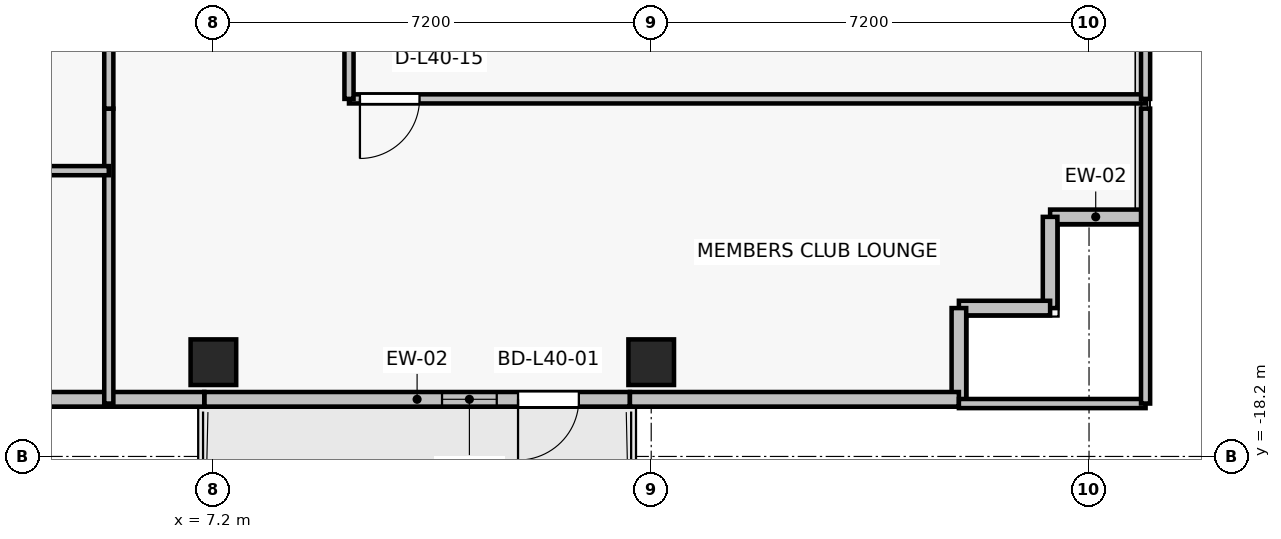
"""IFC4 building model, lengths in metres.
Left out: names, types, materials, properties, quantities, classifications, styles, units other than length and angle.
Written with IfcOpenShell. Run it as: python <this file> out.ifc"""

import sys

from ifc_helpers import new_model, si_unit, direction, frame, frame_2d, origin, origin_2d, place, context, subcontext, project, spatial, rectangle, extrude, source, transform, mapped, element, fill, save


model = new_model("IFC4")
c1 = context("Model", 3, precision=1e-05, world=origin(), true_north=direction((0.0, 1.0)))
c2 = subcontext(c1, "Body", "Model", "MODEL_VIEW")
j1 = project(units=[si_unit("LENGTHUNIT", "METRE"), si_unit("PLANEANGLEUNIT", "RADIAN")], contexts=[c1])
p1 = place(None, origin())
s1 = spatial("IfcSite", under=j1, at=p1, CompositionType="ELEMENT")
p2 = place(p1, origin())
s2 = spatial("IfcBuilding", under=s1, at=p2, CompositionType="ELEMENT")
p3 = place(p2, frame((0.0, 0.0, 146.2)))
s3 = spatial("IfcBuildingStorey", under=s2, at=p3, CompositionType="ELEMENT", Elevation=146.2)
for number, where, z_axis, x_axis in (
    (1, (7.2, -16.65, 0.0), (0.0, 0.0, 1.0), (1.0, 0.0, 0.0)),
    (2, (14.4, -16.65, 0.0), (0.0, 0.0, 1.0), (1.0, 0.0, 0.0)),
):
    element("IfcColumn", number, at=place(p3, frame(where, z_axis=z_axis, x_axis=x_axis)), inside=s3, PredefinedType="COLUMN", context=c2, shape_type="SweptSolid", body=[
        extrude(rectangle(XDim=0.75, YDim=0.75, at=origin_2d()), origin(), (0.0, 0.0, 1.0), 3.3),
    ])
p4 = place(p3, frame((14.05, -17.26, 0.0), z_axis=(0.0, 0.0, 1.0), x_axis=(-1.0, 0.0, 0.0)))
e3 = element("IfcWall", 3, at=p4, inside=s3, PredefinedType="SOLIDWALL", context=c2, shape_type="SweptSolid", body=[
    extrude(rectangle(XDim=7.0, YDim=0.24, at=frame_2d((3.5, 0.0))), origin(), (0.0, 0.0, 1.0), 2.665),
])
p5 = place(p4, frame((0.84, 0.0, 0.0)))
e4 = element("IfcOpeningElement", 4, at=p5, cuts=e3, PredefinedType="OPENING", context=c2, shape_type="SweptSolid", body=[
    extrude(rectangle(XDim=1.0, YDim=2.2, at=frame_2d((0.5, 1.1))), frame((0.0, 0.13, 0.0), z_axis=(0.0, -1.0, 0.0), x_axis=(1.0, 0.0, 0.0)), (0.0, 0.0, 1.0), 0.26),
])
p6 = place(p4, frame((2.19, 0.0, 0.85)))
e5 = element("IfcOpeningElement", 5, at=p6, cuts=e3, PredefinedType="OPENING", context=c2, shape_type="SweptSolid", body=[
    extrude(rectangle(XDim=0.9, YDim=1.35, at=frame_2d((0.45, 0.675))), frame((0.0, 0.13, 0.0), z_axis=(0.0, -1.0, 0.0), x_axis=(1.0, 0.0, 0.0)), (0.0, 0.0, 1.0), 0.26),
])
for number, where, z_axis, x_axis in (
    (6, (20.96, -14.26, 0.0), (0.0, 0.0, 1.0), (1.0, 0.0, 0.0)),
    (7, (20.96, -15.76, 0.0), (0.0, 0.0, 1.0), (0.0, 1.0, 0.0)),
    (8, (19.46, -15.76, 0.0), (0.0, 0.0, 1.0), (1.0, 0.0, 0.0)),
    (9, (19.46, -17.26, 0.0), (0.0, 0.0, 1.0), (0.0, 1.0, 0.0)),
):
    element("IfcWall", number, at=place(p3, frame(where, z_axis=z_axis, x_axis=x_axis)), inside=s3, PredefinedType="SOLIDWALL", context=c2, shape_type="SweptSolid", body=[
        extrude(rectangle(XDim=1.5, YDim=0.24, at=frame_2d((0.75, 0.0))), origin(), (0.0, 0.0, 1.0), 3.075),
    ])
p7 = place(p3, frame((14.05, -17.26, 0.0), z_axis=(0.0, 0.0, 1.0), x_axis=(1.0, 0.0, 0.0)))
e10 = element("IfcWall", 10, at=p7, inside=s3, PredefinedType="SOLIDWALL", context=c2, shape_type="SweptSolid", body=[
    extrude(rectangle(XDim=5.41, YDim=0.24, at=frame_2d((2.705, 0.0))), origin(), (0.0, 0.0, 1.0), 3.075),
])
p8 = place(p3, frame((3.2, -17.26, 0.0), z_axis=(0.0, 0.0, 1.0), x_axis=(1.0, 0.0, 0.0)))
e11 = element("IfcWall", 11, at=p8, inside=s3, PredefinedType="SOLIDWALL", context=c2, shape_type="SweptSolid", body=[
    extrude(rectangle(XDim=3.85, YDim=0.24, at=frame_2d((1.925, 0.0))), origin(), (0.0, 0.0, 1.0), 3.075),
])
p9 = place(p3, frame((22.53, -12.32, 0.0), z_axis=(0.0, 0.0, 1.0), x_axis=(-1.0, 0.0, 0.0)))
e12 = element("IfcWall", 12, at=p9, inside=s3, PredefinedType="PARTITIONING", context=c2, shape_type="SweptSolid", body=[
    extrude(rectangle(XDim=13.1, YDim=0.15, at=frame_2d((6.55, 0.0))), origin(), (0.0, 0.0, 1.0), 2.565),
])
p10 = place(p9, frame((11.94, 0.0, 0.0)))
e13 = element("IfcOpeningElement", 13, at=p10, cuts=e12, PredefinedType="OPENING", context=c2, shape_type="SweptSolid", body=[
    extrude(rectangle(XDim=0.98, YDim=2.15, at=frame_2d((0.49, 1.075))), frame((0.0, 0.085, 0.0), z_axis=(0.0, -1.0, 0.0), x_axis=(1.0, 0.0, 0.0)), (0.0, 0.0, 1.0), 0.17),
])
p11 = place(p3, frame((9.43, -12.32, 0.0), z_axis=(0.0, 0.0, 1.0), x_axis=(0.0, 1.0, 0.0)))
e14 = element("IfcWall", 14, at=p11, inside=s3, PredefinedType="PARTITIONING", context=c2, shape_type="SweptSolid", body=[
    extrude(rectangle(XDim=8.49, YDim=0.15, at=frame_2d((4.245, 0.0))), origin(), (0.0, 0.0, 1.0), 2.565),
])
p12 = place(p3, frame((22.53, -3.83, 0.0), z_axis=(0.0, 0.0, 1.0), x_axis=(0.0, -1.0, 0.0)))
e15 = element("IfcWall", 15, at=p12, inside=s3, PredefinedType="PARTITIONING", context=c2, shape_type="SweptSolid", body=[
    extrude(rectangle(XDim=8.49, YDim=0.15, at=frame_2d((4.245, 0.0))), origin(), (0.0, 0.0, 1.0), 2.665),
])
p13 = place(p3, frame((22.53, -17.33, 0.0), z_axis=(0.0, 0.0, 1.0), x_axis=(-1.0, 0.0, 0.0)))
e16 = element("IfcWall", 16, at=p13, inside=s3, PredefinedType="PARTITIONING", context=c2, shape_type="SweptSolid", body=[
    extrude(rectangle(XDim=3.07, YDim=0.15, at=frame_2d((1.535, 0.0))), origin(), (0.0, 0.0, 1.0), 2.665),
])
p14 = place(p3, frame((5.48, -17.33, 0.0), z_axis=(0.0, 0.0, 1.0), x_axis=(0.0, 1.0, 0.0)))
e17 = element("IfcWall", 17, at=p14, inside=s3, PredefinedType="PARTITIONING", context=c2, shape_type="SweptSolid", body=[
    extrude(rectangle(XDim=4.85, YDim=0.15, at=frame_2d((2.425, 0.0))), origin(), (0.0, 0.0, 1.0), 2.565),
])
p15 = place(p3, frame((22.53, -12.48, 0.0), z_axis=(0.0, 0.0, 1.0), x_axis=(0.0, -1.0, 0.0)))
e18 = element("IfcWall", 18, at=p15, inside=s3, PredefinedType="PARTITIONING", context=c2, shape_type="SweptSolid", body=[
    extrude(rectangle(XDim=4.85, YDim=0.15, at=frame_2d((2.425, 0.0))), origin(), (0.0, 0.0, 1.0), 3.075),
])
p16 = place(p3, frame((5.48, -13.5, 0.0), z_axis=(0.0, 0.0, 1.0), x_axis=(-1.0, 0.0, 0.0)))
e19 = element("IfcWall", 19, at=p16, inside=s3, PredefinedType="PARTITIONING", context=c2, shape_type="SweptSolid", body=[
    extrude(rectangle(XDim=10.96, YDim=0.15, at=frame_2d((5.48, 0.0))), origin(), (0.0, 0.0, 1.0), 2.565),
])
p17 = place(p3, frame((5.48, -3.83, 0.0), z_axis=(0.0, 0.0, 1.0), x_axis=(0.0, -1.0, 0.0)))
e20 = element("IfcWall", 20, at=p17, inside=s3, PredefinedType="PARTITIONING", context=c2, shape_type="SweptSolid", body=[
    extrude(rectangle(XDim=8.65, YDim=0.15, at=frame_2d((4.325, 0.0))), origin(), (0.0, 0.0, 1.0), 2.565),
])
m1 = source(origin(), c2, "Body", "SweptSolid", [
    extrude(rectangle(XDim=1.0, YDim=2.2, at=frame_2d((0.5, 1.1))), frame((0.0, 0.025, 0.0), z_axis=(0.0, -1.0, 0.0), x_axis=(1.0, 0.0, 0.0)), (0.0, 0.0, 1.0), 0.05),
])
p18 = place(p5, origin())
e21 = element("IfcDoor", 21, at=p18, inside=s3, OperationType="SINGLE_SWING_RIGHT", PredefinedType="DOOR", context=c2, shape_type="MappedRepresentation", body=[
    mapped(m1, transform((0.0, 0.0, 0.0), x_axis=(1.0, 0.0, 0.0), y_axis=(0.0, 1.0, 0.0), z_axis=(0.0, 0.0, 1.0), scale=1.0)),
])
fill(e4, e21)
m2 = source(origin(), c2, "Body", "SweptSolid", [
    extrude(rectangle(XDim=0.9, YDim=1.35, at=frame_2d((0.45, 0.675))), frame((0.0, 0.03, 0.0), z_axis=(0.0, -1.0, 0.0), x_axis=(1.0, 0.0, 0.0)), (0.0, 0.0, 1.0), 0.06),
])
p19 = place(p6, origin())
e22 = element("IfcWindow", 22, at=p19, inside=s3, PartitioningType="SINGLE_PANEL", PredefinedType="WINDOW", context=c2, shape_type="MappedRepresentation", body=[
    mapped(m2, transform((0.0, 0.0, 0.0), x_axis=(1.0, 0.0, 0.0), y_axis=(0.0, 1.0, 0.0), z_axis=(0.0, 0.0, 1.0), scale=1.0)),
])
fill(e5, e22)
m3 = source(origin(), c2, "Body", "SweptSolid", [
    extrude(rectangle(XDim=0.98, YDim=2.15, at=frame_2d((0.49, 1.075))), frame((0.0, 0.025, 0.0), z_axis=(0.0, -1.0, 0.0), x_axis=(1.0, 0.0, 0.0)), (0.0, 0.0, 1.0), 0.05),
])
p20 = place(p10, origin())
e23 = element("IfcDoor", 23, at=p20, inside=s3, OperationType="SINGLE_SWING_RIGHT", PredefinedType="DOOR", context=c2, shape_type="MappedRepresentation", body=[
    mapped(m3, transform((0.0, 0.0, 0.0), x_axis=(1.0, 0.0, 0.0), y_axis=(0.0, 1.0, 0.0), z_axis=(0.0, 0.0, 1.0), scale=1.0)),
])
fill(e13, e23)
save(model, sys.argv[1])
